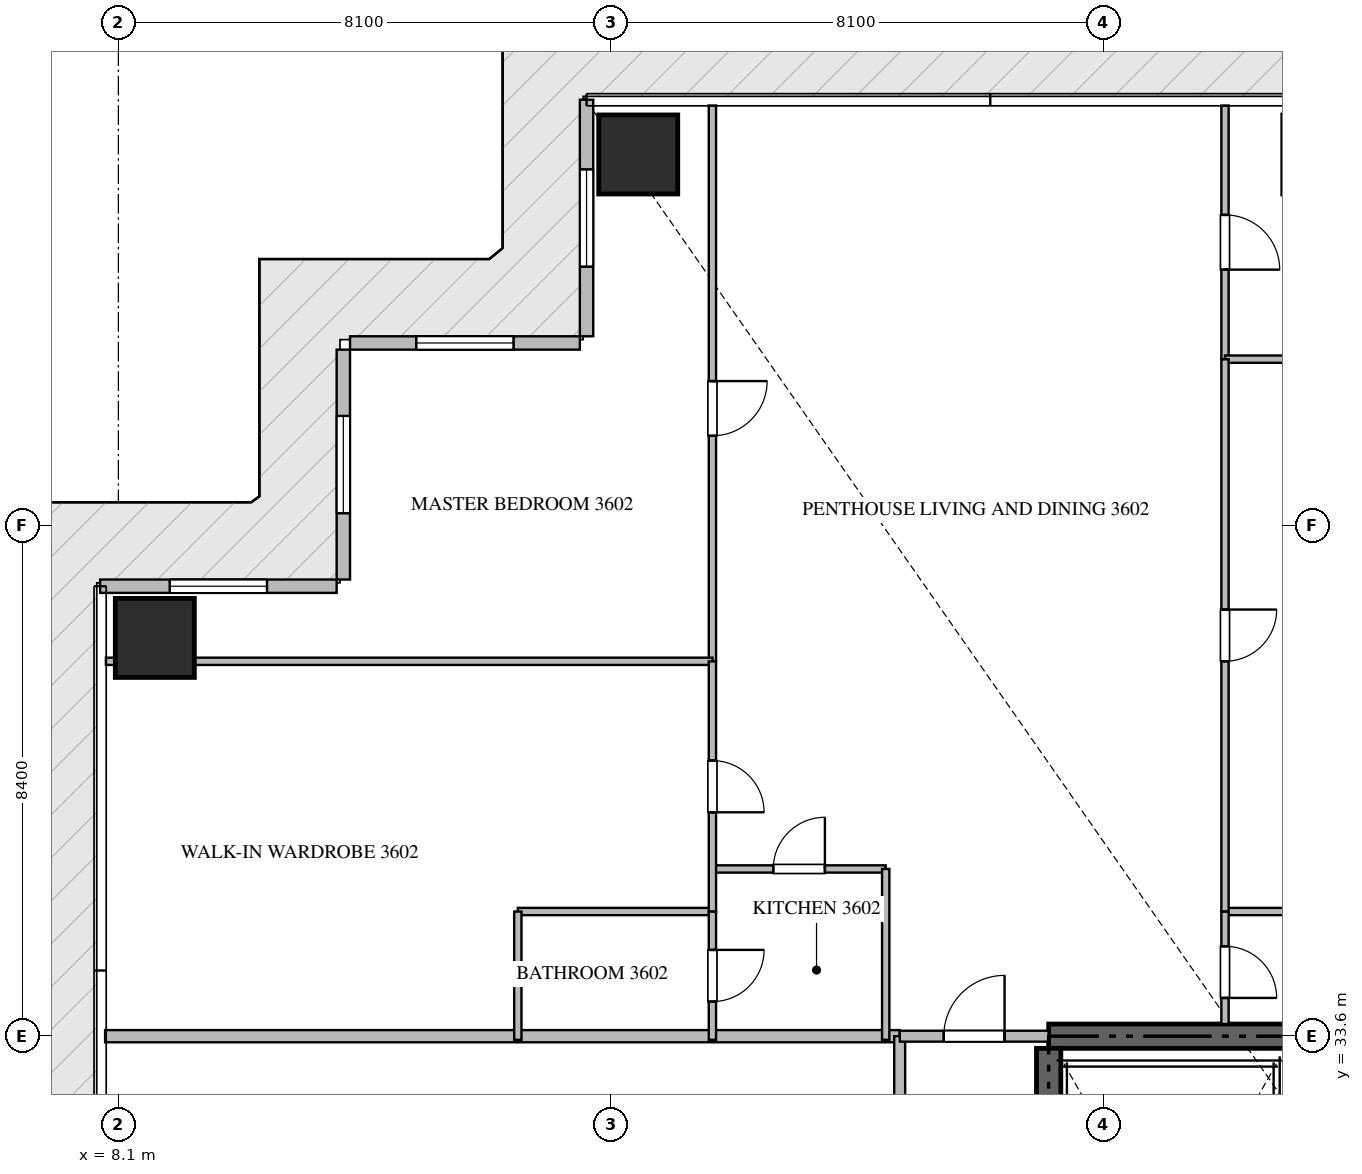
"""IFC4 building model, lengths in metres.
Left out: names, types, materials, properties, quantities, classifications, styles, units other than length and angle.
Written with IfcOpenShell. Run it as: python <this file> out.ifc"""

import sys

from ifc_helpers import new_model, si_unit, direction, frame, frame_2d, origin, origin_2d, place, context, subcontext, project, spatial, rectangle, extrude, source, transform, mapped, element, fill, save


model = new_model("IFC4")
c1 = context("Model", 3, precision=1e-05, world=origin(), true_north=direction((0.0, 1.0)))
c2 = subcontext(c1, "Body", "Model", "MODEL_VIEW")
j1 = project(units=[si_unit("LENGTHUNIT", "METRE"), si_unit("PLANEANGLEUNIT", "RADIAN")], contexts=[c1])
p1 = place(None, origin())
s1 = spatial("IfcSite", under=j1, at=p1, CompositionType="ELEMENT")
p2 = place(p1, origin())
s2 = spatial("IfcBuilding", under=s1, at=p2, CompositionType="ELEMENT")
p3 = place(p2, frame((0.0, 0.0, 146.4)))
s3 = spatial("IfcBuildingStorey", under=s2, at=p3, CompositionType="ELEMENT", Elevation=146.4)
p4 = place(p3, frame((41.4, 33.6, -0.26), z_axis=(0.0, 0.0, 1.0), x_axis=(-1.0, 0.0, 0.0)))
e1 = element("IfcWall", 1, at=p4, inside=s3, PredefinedType="SHEAR", context=c2, shape_type="SweptSolid", body=[
    extrude(rectangle(XDim=18.0, YDim=0.4, at=frame_2d((9.0, 0.0))), origin(), (0.0, 0.0, 1.0), 3.748),
])
p5 = place(p3, frame((23.4, 24.25, -0.26), z_axis=(0.0, 0.0, 1.0), x_axis=(0.0, 1.0, 0.0)))
e2 = element("IfcWall", 2, at=p5, inside=s3, PredefinedType="SHEAR", context=c2, shape_type="SweptSolid", body=[
    extrude(rectangle(XDim=9.15, YDim=0.4, at=frame_2d((4.575, 0.0))), origin(), (0.0, 0.0, 1.0), 3.748),
])
m1 = source(origin(), c2, "Body", "SweptSolid", [
    extrude(rectangle(XDim=1.3, YDim=1.3, at=origin_2d()), origin(), (0.0, 0.0, 1.0), 3.75),
])
for number, where, z_axis, x_axis in (
    (3, (16.65, 48.1, -0.26), (0.0, 0.0, 1.0), (1.0, 0.0, 0.0)),
    (4, (8.7, 40.15, -0.26), (0.0, 0.0, 1.0), (1.0, 0.0, 0.0)),
):
    element("IfcColumn", number, at=place(p3, frame(where, z_axis=z_axis, x_axis=x_axis)), inside=s3, PredefinedType="COLUMN", context=c2, shape_type="MappedRepresentation", body=[
        mapped(m1, transform((0.0, 0.0, 0.0), scale=1.0)),
    ])
p6 = place(p3, frame((15.8, 49.0, 0.0), z_axis=(0.0, 0.0, 1.0), x_axis=(0.0, -1.0, 0.0)))
e5 = element("IfcWall", 5, at=p6, inside=s3, PredefinedType="ELEMENTEDWALL", context=c2, shape_type="SweptSolid", body=[
    extrude(rectangle(XDim=3.89, YDim=0.22, at=frame_2d((1.945, 0.0))), origin(), (0.0, 0.0, 1.0), 3.475),
])
p7 = place(p6, frame((1.145, 0.0, 0.65)))
e6 = element("IfcOpeningElement", 6, at=p7, cuts=e5, PredefinedType="OPENING", context=c2, shape_type="SweptSolid", body=[
    extrude(rectangle(XDim=1.6, YDim=2.1, at=frame_2d((0.8, 1.05))), frame((0.0, 0.12, 0.0), z_axis=(0.0, -1.0, 0.0), x_axis=(1.0, 0.0, 0.0)), (0.0, 0.0, 1.0), 0.24),
])
p8 = place(p3, frame((15.69, 45.0, 0.0), z_axis=(0.0, 0.0, 1.0), x_axis=(-1.0, 0.0, 0.0)))
e7 = element("IfcWall", 7, at=p8, inside=s3, PredefinedType="ELEMENTEDWALL", context=c2, shape_type="SweptSolid", body=[
    extrude(rectangle(XDim=3.78, YDim=0.22, at=frame_2d((1.89, 0.0))), origin(), (0.0, 0.0, 1.0), 3.475),
])
p9 = place(p8, frame((1.09, 0.0, 0.65)))
e8 = element("IfcOpeningElement", 8, at=p9, cuts=e7, PredefinedType="OPENING", context=c2, shape_type="SweptSolid", body=[
    extrude(rectangle(XDim=1.6, YDim=2.1, at=frame_2d((0.8, 1.05))), frame((0.0, 0.12, 0.0), z_axis=(0.0, -1.0, 0.0), x_axis=(1.0, 0.0, 0.0)), (0.0, 0.0, 1.0), 0.24),
])
p10 = place(p3, frame((11.8, 44.89, 0.0), z_axis=(0.0, 0.0, 1.0), x_axis=(0.0, -1.0, 0.0)))
e9 = element("IfcWall", 9, at=p10, inside=s3, PredefinedType="ELEMENTEDWALL", context=c2, shape_type="SweptSolid", body=[
    extrude(rectangle(XDim=3.78, YDim=0.22, at=frame_2d((1.89, 0.0))), origin(), (0.0, 0.0, 1.0), 3.475),
])
p11 = place(p10, frame((1.09, 0.0, 0.65)))
e10 = element("IfcOpeningElement", 10, at=p11, cuts=e9, PredefinedType="OPENING", context=c2, shape_type="SweptSolid", body=[
    extrude(rectangle(XDim=1.6, YDim=2.1, at=frame_2d((0.8, 1.05))), frame((0.0, 0.12, 0.0), z_axis=(0.0, -1.0, 0.0), x_axis=(1.0, 0.0, 0.0)), (0.0, 0.0, 1.0), 0.24),
])
p12 = place(p3, frame((11.69, 41.0, 0.0), z_axis=(0.0, 0.0, 1.0), x_axis=(-1.0, 0.0, 0.0)))
e11 = element("IfcWall", 11, at=p12, inside=s3, PredefinedType="ELEMENTEDWALL", context=c2, shape_type="SweptSolid", body=[
    extrude(rectangle(XDim=3.89, YDim=0.22, at=frame_2d((1.945, 0.0))), origin(), (0.0, 0.0, 1.0), 3.475),
])
p13 = place(p12, frame((1.145, 0.0, 0.65)))
e12 = element("IfcOpeningElement", 12, at=p13, cuts=e11, PredefinedType="OPENING", context=c2, shape_type="SweptSolid", body=[
    extrude(rectangle(XDim=1.6, YDim=2.1, at=frame_2d((0.8, 1.05))), frame((0.0, 0.12, 0.0), z_axis=(0.0, -1.0, 0.0), x_axis=(1.0, 0.0, 0.0)), (0.0, 0.0, 1.0), 0.24),
])
p14 = place(p3, frame((7.882, 33.6, 0.0), z_axis=(0.0, 0.0, 1.0), x_axis=(1.0, 0.0, 0.0)))
e13 = element("IfcWall", 13, at=p14, inside=s3, PredefinedType="PARTITIONING", context=c2, shape_type="SweptSolid", body=[
    extrude(rectangle(XDim=13.068, YDim=0.2, at=frame_2d((6.534, 0.0))), origin(), (0.0, 0.0, 1.0), 3.49),
])
p15 = place(p3, frame((20.95, 14.9, 0.0), z_axis=(0.0, 0.0, 1.0), x_axis=(0.0, 1.0, 0.0)))
e14 = element("IfcWall", 14, at=p15, inside=s3, PredefinedType="PARTITIONING", context=c2, shape_type="SweptSolid", body=[
    extrude(rectangle(XDim=18.7, YDim=0.18, at=frame_2d((9.35, 0.0))), origin(), (0.0, 0.0, 1.0), 3.49),
])
p16 = place(p15, frame((14.603, 0.0, 0.0)))
e15 = element("IfcOpeningElement", 15, at=p16, cuts=e14, PredefinedType="OPENING", context=c2, shape_type="SweptSolid", body=[
    extrude(rectangle(XDim=1.0, YDim=2.15, at=frame_2d((0.5, 1.075))), frame((0.0, 0.1, 0.0), z_axis=(0.0, -1.0, 0.0), x_axis=(1.0, 0.0, 0.0)), (0.0, 0.0, 1.0), 0.2),
])
p17 = place(p3, frame((20.952, 33.6, 0.0), z_axis=(0.0, 0.0, 1.0), x_axis=(1.0, 0.0, 0.0)))
e16 = element("IfcWall", 16, at=p17, inside=s3, PredefinedType="PARTITIONING", context=c2, shape_type="SweptSolid", body=[
    extrude(rectangle(XDim=2.446, YDim=0.18, at=frame_2d((1.223, 0.0))), origin(), (0.0, 0.0, 1.0), 3.49),
])
p18 = place(p17, frame((0.723, 0.0, 0.0)))
e17 = element("IfcOpeningElement", 17, at=p18, cuts=e16, PredefinedType="OPENING", context=c2, shape_type="SweptSolid", body=[
    extrude(rectangle(XDim=1.0, YDim=2.15, at=frame_2d((0.5, 1.075))), frame((0.0, 0.1, 0.0), z_axis=(0.0, -1.0, 0.0), x_axis=(1.0, 0.0, 0.0)), (0.0, 0.0, 1.0), 0.2),
])
p19 = place(p3, frame((17.87, 36.35, 0.0), z_axis=(0.0, 0.0, 1.0), x_axis=(1.0, 0.0, 0.0)))
e18 = element("IfcWall", 18, at=p19, inside=s3, PredefinedType="PARTITIONING", context=c2, shape_type="SweptSolid", body=[
    extrude(rectangle(XDim=2.85, YDim=0.12, at=frame_2d((1.425, 0.0))), origin(), (0.0, 0.0, 1.0), 3.49),
])
p20 = place(p19, frame((1.0, 0.0, 0.0)))
e19 = element("IfcOpeningElement", 19, at=p20, cuts=e18, PredefinedType="OPENING", context=c2, shape_type="SweptSolid", body=[
    extrude(rectangle(XDim=0.85, YDim=2.1, at=frame_2d((0.425, 1.05))), frame((0.0, 0.07, 0.0), z_axis=(0.0, -1.0, 0.0), x_axis=(1.0, 0.0, 0.0)), (0.0, 0.0, 1.0), 0.14),
])
p21 = place(p3, frame((20.72, 36.35, 0.0), z_axis=(0.0, 0.0, 1.0), x_axis=(0.0, -1.0, 0.0)))
e20 = element("IfcWall", 20, at=p21, inside=s3, PredefinedType="PARTITIONING", context=c2, shape_type="SweptSolid", body=[
    extrude(rectangle(XDim=2.81, YDim=0.12, at=frame_2d((1.405, 0.0))), origin(), (0.0, 0.0, 1.0), 3.49),
])
p22 = place(p3, frame((17.87, 48.905, 0.0), z_axis=(0.0, 0.0, 1.0), x_axis=(0.0, -1.0, 0.0)))
e21 = element("IfcWall", 21, at=p22, inside=s3, PredefinedType="PARTITIONING", context=c2, shape_type="SweptSolid", body=[
    extrude(rectangle(XDim=9.14, YDim=0.12, at=frame_2d((4.57, 0.0))), origin(), (0.0, 0.0, 1.0), 3.49),
])
p23 = place(p22, frame((4.532, 0.0, 0.0)))
e22 = element("IfcOpeningElement", 22, at=p23, cuts=e21, PredefinedType="OPENING", context=c2, shape_type="SweptSolid", body=[
    extrude(rectangle(XDim=0.9, YDim=2.1, at=frame_2d((0.45, 1.05))), frame((0.0, 0.07, 0.0), z_axis=(0.0, -1.0, 0.0), x_axis=(1.0, 0.0, 0.0)), (0.0, 0.0, 1.0), 0.14),
])
p24 = place(p3, frame((7.895, 39.765, 0.0), z_axis=(0.0, 0.0, 1.0), x_axis=(1.0, 0.0, 0.0)))
e23 = element("IfcWall", 23, at=p24, inside=s3, PredefinedType="PARTITIONING", context=c2, shape_type="SweptSolid", body=[
    extrude(rectangle(XDim=9.975, YDim=0.12, at=frame_2d((4.988, 0.0))), origin(), (0.0, 0.0, 1.0), 3.49),
])
p25 = place(p3, frame((14.67, 35.65, 0.0), z_axis=(0.0, 0.0, 1.0), x_axis=(1.0, 0.0, 0.0)))
e24 = element("IfcWall", 24, at=p25, inside=s3, PredefinedType="PARTITIONING", context=c2, shape_type="SweptSolid", body=[
    extrude(rectangle(XDim=3.2, YDim=0.12, at=frame_2d((1.6, 0.0))), origin(), (0.0, 0.0, 1.0), 3.49),
])
p26 = place(p3, frame((14.67, 35.65, 0.0), z_axis=(0.0, 0.0, 1.0), x_axis=(0.0, -1.0, 0.0)))
e25 = element("IfcWall", 25, at=p26, inside=s3, PredefinedType="PARTITIONING", context=c2, shape_type="SweptSolid", body=[
    extrude(rectangle(XDim=2.11, YDim=0.12, at=frame_2d((1.055, 0.0))), origin(), (0.0, 0.0, 1.0), 3.49),
])
p27 = place(p3, frame((17.87, 39.763, 0.0), z_axis=(0.0, 0.0, 1.0), x_axis=(0.0, -1.0, 0.0)))
e26 = element("IfcWall", 26, at=p27, inside=s3, PredefinedType="PARTITIONING", context=c2, shape_type="SweptSolid", body=[
    extrude(rectangle(XDim=4.113, YDim=0.12, at=frame_2d((2.057, 0.0))), origin(), (0.0, 0.0, 1.0), 3.49),
])
p28 = place(p27, frame((1.631, 0.0, 0.0)))
e27 = element("IfcOpeningElement", 27, at=p28, cuts=e26, PredefinedType="OPENING", context=c2, shape_type="SweptSolid", body=[
    extrude(rectangle(XDim=0.85, YDim=2.1, at=frame_2d((0.425, 1.05))), frame((0.0, 0.07, 0.0), z_axis=(0.0, -1.0, 0.0), x_axis=(1.0, 0.0, 0.0)), (0.0, 0.0, 1.0), 0.14),
])
p29 = place(p3, frame((17.87, 35.648, 0.0), z_axis=(0.0, 0.0, 1.0), x_axis=(0.0, -1.0, 0.0)))
e28 = element("IfcWall", 28, at=p29, inside=s3, PredefinedType="PARTITIONING", context=c2, shape_type="SweptSolid", body=[
    extrude(rectangle(XDim=2.108, YDim=0.12, at=frame_2d((1.054, 0.0))), origin(), (0.0, 0.0, 1.0), 3.49),
])
p30 = place(p29, frame((0.629, 0.0, 0.0)))
e29 = element("IfcOpeningElement", 29, at=p30, cuts=e28, PredefinedType="OPENING", context=c2, shape_type="SweptSolid", body=[
    extrude(rectangle(XDim=0.85, YDim=2.1, at=frame_2d((0.425, 1.05))), frame((0.0, 0.07, 0.0), z_axis=(0.0, -1.0, 0.0), x_axis=(1.0, 0.0, 0.0)), (0.0, 0.0, 1.0), 0.14),
])
p31 = place(p3, frame((26.3, 48.905, 0.0), z_axis=(0.0, 0.0, 1.0), x_axis=(0.0, -1.0, 0.0)))
e30 = element("IfcWall", 30, at=p31, inside=s3, PredefinedType="PARTITIONING", context=c2, shape_type="SweptSolid", body=[
    extrude(rectangle(XDim=4.171, YDim=0.12, at=frame_2d((2.085, 0.0))), origin(), (0.0, 0.0, 1.0), 3.49),
])
p32 = place(p31, frame((1.799, 0.0, 0.0)))
e31 = element("IfcOpeningElement", 31, at=p32, cuts=e30, PredefinedType="OPENING", context=c2, shape_type="SweptSolid", body=[
    extrude(rectangle(XDim=0.9, YDim=2.1, at=frame_2d((0.45, 1.05))), frame((0.0, 0.07, 0.0), z_axis=(0.0, -1.0, 0.0), x_axis=(1.0, 0.0, 0.0)), (0.0, 0.0, 1.0), 0.14),
])
for number, where, z_axis, x_axis in (
    (32, (26.3, 44.734, 0.0), (0.0, 0.0, 1.0), (1.0, 0.0, 0.0)),
    (33, (26.3, 35.65, 0.0), (0.0, 0.0, 1.0), (1.0, 0.0, 0.0)),
):
    element("IfcWall", number, at=place(p3, frame(where, z_axis=z_axis, x_axis=x_axis)), inside=s3, PredefinedType="PARTITIONING", context=c2, shape_type="SweptSolid", body=[
        extrude(rectangle(XDim=7.36, YDim=0.12, at=frame_2d((3.68, 0.0))), origin(), (0.0, 0.0, 1.0), 3.49),
    ])
p33 = place(p3, frame((26.3, 44.732, 0.0), z_axis=(0.0, 0.0, 1.0), x_axis=(0.0, -1.0, 0.0)))
e34 = element("IfcWall", 34, at=p33, inside=s3, PredefinedType="PARTITIONING", context=c2, shape_type="SweptSolid", body=[
    extrude(rectangle(XDim=9.082, YDim=0.12, at=frame_2d((4.541, 0.0))), origin(), (0.0, 0.0, 1.0), 3.49),
])
p34 = place(p33, frame((4.116, 0.0, 0.0)))
e35 = element("IfcOpeningElement", 35, at=p34, cuts=e34, PredefinedType="OPENING", context=c2, shape_type="SweptSolid", body=[
    extrude(rectangle(XDim=0.85, YDim=2.1, at=frame_2d((0.425, 1.05))), frame((0.0, 0.07, 0.0), z_axis=(0.0, -1.0, 0.0), x_axis=(1.0, 0.0, 0.0)), (0.0, 0.0, 1.0), 0.14),
])
p35 = place(p3, frame((26.3, 35.648, 0.0), z_axis=(0.0, 0.0, 1.0), x_axis=(0.0, -1.0, 0.0)))
e36 = element("IfcWall", 36, at=p35, inside=s3, PredefinedType="PARTITIONING", context=c2, shape_type="SweptSolid", body=[
    extrude(rectangle(XDim=1.848, YDim=0.12, at=frame_2d((0.924, 0.0))), origin(), (0.0, 0.0, 1.0), 3.49),
])
p36 = place(p35, frame((0.569, 0.0, 0.0)))
e37 = element("IfcOpeningElement", 37, at=p36, cuts=e36, PredefinedType="OPENING", context=c2, shape_type="SweptSolid", body=[
    extrude(rectangle(XDim=0.85, YDim=2.1, at=frame_2d((0.425, 1.05))), frame((0.0, 0.07, 0.0), z_axis=(0.0, -1.0, 0.0), x_axis=(1.0, 0.0, 0.0)), (0.0, 0.0, 1.0), 0.14),
])
m2 = source(origin(), c2, "Body", "SweptSolid", [
    extrude(rectangle(XDim=1.6, YDim=2.1, at=frame_2d((0.8, 1.05))), frame((0.0, 0.03, 0.0), z_axis=(0.0, -1.0, 0.0), x_axis=(1.0, 0.0, 0.0)), (0.0, 0.0, 1.0), 0.06),
])
p37 = place(p7, origin())
e38 = element("IfcWindow", 38, at=p37, inside=s3, PartitioningType="SINGLE_PANEL", PredefinedType="WINDOW", context=c2, shape_type="MappedRepresentation", body=[
    mapped(m2, transform((0.0, 0.0, 0.0), scale=1.0)),
])
fill(e6, e38)
p38 = place(p9, origin())
e39 = element("IfcWindow", 39, at=p38, inside=s3, PartitioningType="SINGLE_PANEL", PredefinedType="WINDOW", context=c2, shape_type="MappedRepresentation", body=[
    mapped(m2, transform((0.0, 0.0, 0.0), scale=1.0)),
])
fill(e8, e39)
p39 = place(p11, origin())
e40 = element("IfcWindow", 40, at=p39, inside=s3, PartitioningType="SINGLE_PANEL", PredefinedType="WINDOW", context=c2, shape_type="MappedRepresentation", body=[
    mapped(m2, transform((0.0, 0.0, 0.0), scale=1.0)),
])
fill(e10, e40)
p40 = place(p13, origin())
e41 = element("IfcWindow", 41, at=p40, inside=s3, PartitioningType="SINGLE_PANEL", PredefinedType="WINDOW", context=c2, shape_type="MappedRepresentation", body=[
    mapped(m2, transform((0.0, 0.0, 0.0), scale=1.0)),
])
fill(e12, e41)
m3 = source(origin(), c2, "Body", "SweptSolid", [
    extrude(rectangle(XDim=1.0, YDim=2.15, at=frame_2d((0.5, 1.075))), frame((0.0, 0.025, 0.0), z_axis=(0.0, -1.0, 0.0), x_axis=(1.0, 0.0, 0.0)), (0.0, 0.0, 1.0), 0.05),
])
p41 = place(p18, origin())
e42 = element("IfcDoor", 42, at=p41, inside=s3, OperationType="SINGLE_SWING_RIGHT", PredefinedType="DOOR", context=c2, shape_type="MappedRepresentation", body=[
    mapped(m3, transform((0.0, 0.0, 0.0), scale=1.0)),
])
fill(e17, e42)
m4 = source(origin(), c2, "Body", "SweptSolid", [
    extrude(rectangle(XDim=0.85, YDim=2.1, at=frame_2d((0.425, 1.05))), frame((0.0, 0.025, 0.0), z_axis=(0.0, -1.0, 0.0), x_axis=(1.0, 0.0, 0.0)), (0.0, 0.0, 1.0), 0.05),
])
p42 = place(p20, origin())
e43 = element("IfcDoor", 43, at=p42, inside=s3, OperationType="SINGLE_SWING_RIGHT", PredefinedType="DOOR", context=c2, shape_type="MappedRepresentation", body=[
    mapped(m4, transform((0.0, 0.0, 0.0), scale=1.0)),
])
fill(e19, e43)
m5 = source(origin(), c2, "Body", "SweptSolid", [
    extrude(rectangle(XDim=0.9, YDim=2.1, at=frame_2d((0.45, 1.05))), frame((0.0, 0.025, 0.0), z_axis=(0.0, -1.0, 0.0), x_axis=(1.0, 0.0, 0.0)), (0.0, 0.0, 1.0), 0.05),
])
p43 = place(p23, origin())
e44 = element("IfcDoor", 44, at=p43, inside=s3, OperationType="SINGLE_SWING_LEFT", PredefinedType="DOOR", context=c2, shape_type="MappedRepresentation", body=[
    mapped(m5, transform((0.0, 0.0, 0.0), scale=1.0)),
])
fill(e22, e44)
p44 = place(p28, origin())
e45 = element("IfcDoor", 45, at=p44, inside=s3, OperationType="SINGLE_SWING_RIGHT", PredefinedType="DOOR", context=c2, shape_type="MappedRepresentation", body=[
    mapped(m4, transform((0.0, 0.0, 0.0), scale=1.0)),
])
fill(e27, e45)
p45 = place(p30, origin())
e46 = element("IfcDoor", 46, at=p45, inside=s3, OperationType="SINGLE_SWING_LEFT", PredefinedType="DOOR", context=c2, shape_type="MappedRepresentation", body=[
    mapped(m4, transform((0.0, 0.0, 0.0), scale=1.0)),
])
fill(e29, e46)
p46 = place(p32, origin())
e47 = element("IfcDoor", 47, at=p46, inside=s3, OperationType="SINGLE_SWING_RIGHT", PredefinedType="DOOR", context=c2, shape_type="MappedRepresentation", body=[
    mapped(m5, transform((0.0, 0.0, 0.0), scale=1.0)),
])
fill(e31, e47)
p47 = place(p34, origin())
e48 = element("IfcDoor", 48, at=p47, inside=s3, OperationType="SINGLE_SWING_LEFT", PredefinedType="DOOR", context=c2, shape_type="MappedRepresentation", body=[
    mapped(m4, transform((0.0, 0.0, 0.0), scale=1.0)),
])
fill(e35, e48)
p48 = place(p36, origin())
e49 = element("IfcDoor", 49, at=p48, inside=s3, OperationType="SINGLE_SWING_RIGHT", PredefinedType="DOOR", context=c2, shape_type="MappedRepresentation", body=[
    mapped(m4, transform((0.0, 0.0, 0.0), scale=1.0)),
])
fill(e37, e49)
save(model, sys.argv[1])
